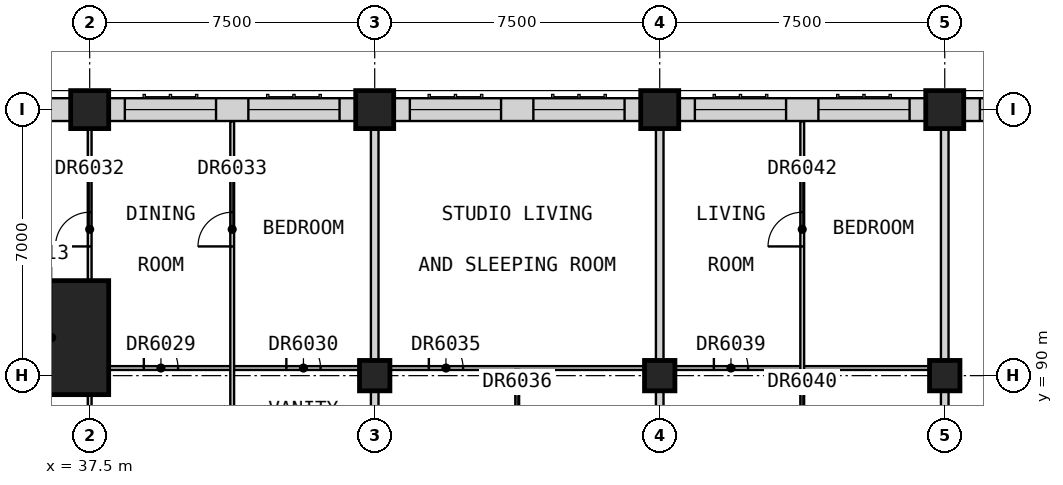
"""IFC4 building model, lengths in metres.
Left out: names, types, materials, properties, quantities, classifications, styles, units other than length and angle.
Written with IfcOpenShell. Run it as: python <this file> out.ifc"""

import sys

from ifc_helpers import new_model, si_unit, direction, frame, frame_2d, origin, origin_2d, place, context, subcontext, project, spatial, rectangle, extrude, element, fill, save


model = new_model("IFC4")
c1 = context("Model", 3, precision=1e-05, world=origin(), true_north=direction((0.0, 1.0)))
c2 = subcontext(c1, "Body", "Model", "MODEL_VIEW")
j1 = project(units=[si_unit("LENGTHUNIT", "METRE"), si_unit("PLANEANGLEUNIT", "RADIAN")], contexts=[c1])
p1 = place(None, origin())
s1 = spatial("IfcSite", under=j1, at=p1, CompositionType="ELEMENT")
p2 = place(p1, origin())
s2 = spatial("IfcBuilding", under=s1, at=p2, CompositionType="ELEMENT")
p3 = place(p2, frame((0.0, 0.0, 254.7)))
s3 = spatial("IfcBuildingStorey", under=s2, at=p3, CompositionType="ELEMENT", Elevation=254.7)
p4 = place(p3, frame((37.5, 97.0, 0.0), z_axis=(0.0, 0.0, 1.0), x_axis=(1.0, 0.0, 0.0)))
e1 = element("IfcColumn", 1, at=p4, inside=s3, PredefinedType="COLUMN", context=c2, shape_type="SweptSolid", body=[
    extrude(rectangle(XDim=1.0, YDim=1.0, at=origin_2d()), origin(), (0.0, 0.0, 1.0), 3.5),
])
p5 = place(p3, frame((45.0, 90.0, 0.0), z_axis=(0.0, 0.0, 1.0), x_axis=(1.0, 0.0, 0.0)))
e2 = element("IfcColumn", 2, at=p5, inside=s3, PredefinedType="COLUMN", context=c2, shape_type="SweptSolid", body=[
    extrude(rectangle(XDim=0.8, YDim=0.8, at=origin_2d()), origin(), (0.0, 0.0, 1.0), 3.5),
])
p6 = place(p3, frame((45.0, 97.0, 0.0), z_axis=(0.0, 0.0, 1.0), x_axis=(1.0, 0.0, 0.0)))
e3 = element("IfcColumn", 3, at=p6, inside=s3, PredefinedType="COLUMN", context=c2, shape_type="SweptSolid", body=[
    extrude(rectangle(XDim=1.0, YDim=1.0, at=origin_2d()), origin(), (0.0, 0.0, 1.0), 3.5),
])
p7 = place(p3, frame((52.5, 90.0, 0.0), z_axis=(0.0, 0.0, 1.0), x_axis=(1.0, 0.0, 0.0)))
e4 = element("IfcColumn", 4, at=p7, inside=s3, PredefinedType="COLUMN", context=c2, shape_type="SweptSolid", body=[
    extrude(rectangle(XDim=0.8, YDim=0.8, at=origin_2d()), origin(), (0.0, 0.0, 1.0), 3.5),
])
p8 = place(p3, frame((52.5, 97.0, 0.0), z_axis=(0.0, 0.0, 1.0), x_axis=(1.0, 0.0, 0.0)))
e5 = element("IfcColumn", 5, at=p8, inside=s3, PredefinedType="COLUMN", context=c2, shape_type="SweptSolid", body=[
    extrude(rectangle(XDim=1.0, YDim=1.0, at=origin_2d()), origin(), (0.0, 0.0, 1.0), 3.5),
])
p9 = place(p3, frame((60.0, 90.0, 0.0), z_axis=(0.0, 0.0, 1.0), x_axis=(1.0, 0.0, 0.0)))
e6 = element("IfcColumn", 6, at=p9, inside=s3, PredefinedType="COLUMN", context=c2, shape_type="SweptSolid", body=[
    extrude(rectangle(XDim=0.8, YDim=0.8, at=origin_2d()), origin(), (0.0, 0.0, 1.0), 3.5),
])
p10 = place(p3, frame((60.0, 97.0, 0.0), z_axis=(0.0, 0.0, 1.0), x_axis=(1.0, 0.0, 0.0)))
e7 = element("IfcColumn", 7, at=p10, inside=s3, PredefinedType="COLUMN", context=c2, shape_type="SweptSolid", body=[
    extrude(rectangle(XDim=1.0, YDim=1.0, at=origin_2d()), origin(), (0.0, 0.0, 1.0), 3.5),
])
p11 = place(p3, frame((36.5, 91.0, 0.0), z_axis=(0.0, 0.0, 1.0), x_axis=(1.0, 0.0, 0.0)))
e8 = element("IfcColumn", 8, at=p11, inside=s3, PredefinedType="COLUMN", context=c2, shape_type="SweptSolid", body=[
    extrude(rectangle(XDim=3.0, YDim=3.0, at=origin_2d()), origin(), (0.0, 0.0, 1.0), 3.5),
])
p12 = place(p3, frame((67.0, 97.0, 0.0), z_axis=(0.0, 0.0, 1.0), x_axis=(-1.0, 0.0, 0.0)))
e9 = element("IfcWall", 9, at=p12, inside=s3, PredefinedType="SOLIDWALL", context=c2, shape_type="SweptSolid", body=[
    extrude(rectangle(XDim=6.5, YDim=0.6, at=frame_2d((3.25, 0.0))), origin(), (0.0, 0.0, 1.0), 2.75),
])
p13 = place(p12, frame((3.675, 0.0, 0.8)))
e10 = element("IfcOpeningElement", 10, at=p13, cuts=e9, PredefinedType="OPENING", context=c2, shape_type="SweptSolid", body=[
    extrude(rectangle(XDim=2.4, YDim=1.8, at=frame_2d((1.2, 0.9))), frame((0.0, 0.31, 0.0), z_axis=(0.0, -1.0, 0.0), x_axis=(1.0, 0.0, 0.0)), (0.0, 0.0, 1.0), 0.62),
])
p14 = place(p12, frame((0.425, 0.0, 0.8)))
e11 = element("IfcOpeningElement", 11, at=p14, cuts=e9, PredefinedType="OPENING", context=c2, shape_type="SweptSolid", body=[
    extrude(rectangle(XDim=2.4, YDim=1.8, at=frame_2d((1.2, 0.9))), frame((0.0, 0.31, 0.0), z_axis=(0.0, -1.0, 0.0), x_axis=(1.0, 0.0, 0.0)), (0.0, 0.0, 1.0), 0.62),
])
p15 = place(p3, frame((59.5, 97.0, 0.0), z_axis=(0.0, 0.0, 1.0), x_axis=(-1.0, 0.0, 0.0)))
e12 = element("IfcWall", 12, at=p15, inside=s3, PredefinedType="SOLIDWALL", context=c2, shape_type="SweptSolid", body=[
    extrude(rectangle(XDim=6.5, YDim=0.6, at=frame_2d((3.25, 0.0))), origin(), (0.0, 0.0, 1.0), 2.75),
])
p16 = place(p15, frame((3.675, 0.0, 0.8)))
e13 = element("IfcOpeningElement", 13, at=p16, cuts=e12, PredefinedType="OPENING", context=c2, shape_type="SweptSolid", body=[
    extrude(rectangle(XDim=2.4, YDim=1.8, at=frame_2d((1.2, 0.9))), frame((0.0, 0.31, 0.0), z_axis=(0.0, -1.0, 0.0), x_axis=(1.0, 0.0, 0.0)), (0.0, 0.0, 1.0), 0.62),
])
p17 = place(p15, frame((0.425, 0.0, 0.8)))
e14 = element("IfcOpeningElement", 14, at=p17, cuts=e12, PredefinedType="OPENING", context=c2, shape_type="SweptSolid", body=[
    extrude(rectangle(XDim=2.4, YDim=1.8, at=frame_2d((1.2, 0.9))), frame((0.0, 0.31, 0.0), z_axis=(0.0, -1.0, 0.0), x_axis=(1.0, 0.0, 0.0)), (0.0, 0.0, 1.0), 0.62),
])
p18 = place(p3, frame((52.0, 97.0, 0.0), z_axis=(0.0, 0.0, 1.0), x_axis=(-1.0, 0.0, 0.0)))
e15 = element("IfcWall", 15, at=p18, inside=s3, PredefinedType="SOLIDWALL", context=c2, shape_type="SweptSolid", body=[
    extrude(rectangle(XDim=6.5, YDim=0.6, at=frame_2d((3.25, 0.0))), origin(), (0.0, 0.0, 1.0), 2.75),
])
p19 = place(p18, frame((3.675, 0.0, 0.8)))
e16 = element("IfcOpeningElement", 16, at=p19, cuts=e15, PredefinedType="OPENING", context=c2, shape_type="SweptSolid", body=[
    extrude(rectangle(XDim=2.4, YDim=1.8, at=frame_2d((1.2, 0.9))), frame((0.0, 0.31, 0.0), z_axis=(0.0, -1.0, 0.0), x_axis=(1.0, 0.0, 0.0)), (0.0, 0.0, 1.0), 0.62),
])
p20 = place(p18, frame((0.425, 0.0, 0.8)))
e17 = element("IfcOpeningElement", 17, at=p20, cuts=e15, PredefinedType="OPENING", context=c2, shape_type="SweptSolid", body=[
    extrude(rectangle(XDim=2.4, YDim=1.8, at=frame_2d((1.2, 0.9))), frame((0.0, 0.31, 0.0), z_axis=(0.0, -1.0, 0.0), x_axis=(1.0, 0.0, 0.0)), (0.0, 0.0, 1.0), 0.62),
])
p21 = place(p3, frame((44.5, 97.0, 0.0), z_axis=(0.0, 0.0, 1.0), x_axis=(-1.0, 0.0, 0.0)))
e18 = element("IfcWall", 18, at=p21, inside=s3, PredefinedType="SOLIDWALL", context=c2, shape_type="SweptSolid", body=[
    extrude(rectangle(XDim=6.5, YDim=0.6, at=frame_2d((3.25, 0.0))), origin(), (0.0, 0.0, 1.0), 2.75),
])
p22 = place(p21, frame((3.675, 0.0, 0.8)))
e19 = element("IfcOpeningElement", 19, at=p22, cuts=e18, PredefinedType="OPENING", context=c2, shape_type="SweptSolid", body=[
    extrude(rectangle(XDim=2.4, YDim=1.8, at=frame_2d((1.2, 0.9))), frame((0.0, 0.31, 0.0), z_axis=(0.0, -1.0, 0.0), x_axis=(1.0, 0.0, 0.0)), (0.0, 0.0, 1.0), 0.62),
])
p23 = place(p21, frame((0.425, 0.0, 0.8)))
e20 = element("IfcOpeningElement", 20, at=p23, cuts=e18, PredefinedType="OPENING", context=c2, shape_type="SweptSolid", body=[
    extrude(rectangle(XDim=2.4, YDim=1.8, at=frame_2d((1.2, 0.9))), frame((0.0, 0.31, 0.0), z_axis=(0.0, -1.0, 0.0), x_axis=(1.0, 0.0, 0.0)), (0.0, 0.0, 1.0), 0.62),
])
p24 = place(p3, frame((37.0, 97.0, 0.0), z_axis=(0.0, 0.0, 1.0), x_axis=(-1.0, 0.0, 0.0)))
e21 = element("IfcWall", 21, at=p24, inside=s3, PredefinedType="SOLIDWALL", context=c2, shape_type="SweptSolid", body=[
    extrude(rectangle(XDim=2.0, YDim=0.6, at=frame_2d((1.0, 0.0))), origin(), (0.0, 0.0, 1.0), 3.1),
])
for number, where, z_axis, x_axis in (
    (22, (45.0, 84.375, 0.0), (0.0, 0.0, 1.0), (0.0, 1.0, 0.0)),
    (23, (52.5, 84.375, 0.0), (0.0, 0.0, 1.0), (0.0, 1.0, 0.0)),
    (24, (60.0, 84.375, 0.0), (0.0, 0.0, 1.0), (0.0, 1.0, 0.0)),
):
    element("IfcWall", number, at=place(p3, frame(where, z_axis=z_axis, x_axis=x_axis)), inside=s3, PredefinedType="PARTITIONING", context=c2, shape_type="SweptSolid", body=[
        extrude(rectangle(XDim=13.125, YDim=0.2, at=frame_2d((6.562, 0.0))), origin(), (0.0, 0.0, 1.0), 3.1),
    ])
p25 = place(p3, frame((30.0, 90.2, 0.0), z_axis=(0.0, 0.0, 1.0), x_axis=(1.0, 0.0, 0.0)))
e25 = element("IfcWall", 25, at=p25, inside=s3, PredefinedType="PARTITIONING", context=c2, shape_type="SweptSolid", body=[
    extrude(rectangle(XDim=29.9, YDim=0.1, at=frame_2d((14.95, 0.0))), origin(), (0.0, 0.0, 1.0), 2.75),
])
p26 = place(p25, frame((1.425, 0.0, 0.0)))
e26 = element("IfcOpeningElement", 26, at=p26, cuts=e25, PredefinedType="OPENING", context=c2, shape_type="SweptSolid", body=[
    extrude(rectangle(XDim=0.9, YDim=2.1, at=frame_2d((0.45, 1.05))), frame((0.0, 0.06, 0.0), z_axis=(0.0, -1.0, 0.0), x_axis=(1.0, 0.0, 0.0)), (0.0, 0.0, 1.0), 0.12),
])
p27 = place(p25, frame((8.925, 0.0, 0.0)))
e27 = element("IfcOpeningElement", 27, at=p27, cuts=e25, PredefinedType="OPENING", context=c2, shape_type="SweptSolid", body=[
    extrude(rectangle(XDim=0.9, YDim=2.1, at=frame_2d((0.45, 1.05))), frame((0.0, 0.06, 0.0), z_axis=(0.0, -1.0, 0.0), x_axis=(1.0, 0.0, 0.0)), (0.0, 0.0, 1.0), 0.12),
])
p28 = place(p25, frame((12.675, 0.0, 0.0)))
e28 = element("IfcOpeningElement", 28, at=p28, cuts=e25, PredefinedType="OPENING", context=c2, shape_type="SweptSolid", body=[
    extrude(rectangle(XDim=0.9, YDim=2.1, at=frame_2d((0.45, 1.05))), frame((0.0, 0.06, 0.0), z_axis=(0.0, -1.0, 0.0), x_axis=(1.0, 0.0, 0.0)), (0.0, 0.0, 1.0), 0.12),
])
p29 = place(p25, frame((16.425, 0.0, 0.0)))
e29 = element("IfcOpeningElement", 29, at=p29, cuts=e25, PredefinedType="OPENING", context=c2, shape_type="SweptSolid", body=[
    extrude(rectangle(XDim=0.9, YDim=2.1, at=frame_2d((0.45, 1.05))), frame((0.0, 0.06, 0.0), z_axis=(0.0, -1.0, 0.0), x_axis=(1.0, 0.0, 0.0)), (0.0, 0.0, 1.0), 0.12),
])
p30 = place(p25, frame((23.925, 0.0, 0.0)))
e30 = element("IfcOpeningElement", 30, at=p30, cuts=e25, PredefinedType="OPENING", context=c2, shape_type="SweptSolid", body=[
    extrude(rectangle(XDim=0.9, YDim=2.1, at=frame_2d((0.45, 1.05))), frame((0.0, 0.06, 0.0), z_axis=(0.0, -1.0, 0.0), x_axis=(1.0, 0.0, 0.0)), (0.0, 0.0, 1.0), 0.12),
])
p31 = place(p3, frame((37.5, 87.312, 0.0), z_axis=(0.0, 0.0, 1.0), x_axis=(0.0, 1.0, 0.0)))
e31 = element("IfcWall", 31, at=p31, inside=s3, PredefinedType="PARTITIONING", context=c2, shape_type="SweptSolid", body=[
    extrude(rectangle(XDim=10.188, YDim=0.1, at=frame_2d((5.094, 0.0))), origin(), (0.0, 0.0, 1.0), 2.75),
])
p32 = place(p31, frame((6.087, 0.0, 0.0)))
e32 = element("IfcOpeningElement", 32, at=p32, cuts=e31, PredefinedType="OPENING", context=c2, shape_type="SweptSolid", body=[
    extrude(rectangle(XDim=0.9, YDim=2.1, at=frame_2d((0.45, 1.05))), frame((0.0, 0.06, 0.0), z_axis=(0.0, -1.0, 0.0), x_axis=(1.0, 0.0, 0.0)), (0.0, 0.0, 1.0), 0.12),
])
p33 = place(p3, frame((41.25, 87.312, 0.0), z_axis=(0.0, 0.0, 1.0), x_axis=(0.0, 1.0, 0.0)))
e33 = element("IfcWall", 33, at=p33, inside=s3, PredefinedType="PARTITIONING", context=c2, shape_type="SweptSolid", body=[
    extrude(rectangle(XDim=9.377, YDim=0.1, at=frame_2d((4.689, 0.0))), origin(), (0.0, 0.0, 1.0), 3.1),
])
p34 = place(p33, frame((6.087, 0.0, 0.0)))
e34 = element("IfcOpeningElement", 34, at=p34, cuts=e33, PredefinedType="OPENING", context=c2, shape_type="SweptSolid", body=[
    extrude(rectangle(XDim=0.9, YDim=2.1, at=frame_2d((0.45, 1.05))), frame((0.0, 0.06, 0.0), z_axis=(0.0, -1.0, 0.0), x_axis=(1.0, 0.0, 0.0)), (0.0, 0.0, 1.0), 0.12),
])
p35 = place(p3, frame((48.75, 87.312, 0.0), z_axis=(0.0, 0.0, 1.0), x_axis=(0.0, 1.0, 0.0)))
e35 = element("IfcWall", 35, at=p35, inside=s3, PredefinedType="PARTITIONING", context=c2, shape_type="SweptSolid", body=[
    extrude(rectangle(XDim=2.837, YDim=0.1, at=frame_2d((1.419, 0.0))), origin(), (0.0, 0.0, 1.0), 3.1),
])
p36 = place(p35, frame((0.962, 0.0, 0.0)))
e36 = element("IfcOpeningElement", 36, at=p36, cuts=e35, PredefinedType="OPENING", context=c2, shape_type="SweptSolid", body=[
    extrude(rectangle(XDim=0.9, YDim=2.1, at=frame_2d((0.45, 1.05))), frame((0.0, 0.06, 0.0), z_axis=(0.0, -1.0, 0.0), x_axis=(1.0, 0.0, 0.0)), (0.0, 0.0, 1.0), 0.12),
])
p37 = place(p3, frame((56.25, 87.312, 0.0), z_axis=(0.0, 0.0, 1.0), x_axis=(0.0, 1.0, 0.0)))
e37 = element("IfcWall", 37, at=p37, inside=s3, PredefinedType="PARTITIONING", context=c2, shape_type="SweptSolid", body=[
    extrude(rectangle(XDim=9.377, YDim=0.1, at=frame_2d((4.689, 0.0))), origin(), (0.0, 0.0, 1.0), 3.1),
])
p38 = place(p37, frame((0.962, 0.0, 0.0)))
e38 = element("IfcOpeningElement", 38, at=p38, cuts=e37, PredefinedType="OPENING", context=c2, shape_type="SweptSolid", body=[
    extrude(rectangle(XDim=0.9, YDim=2.1, at=frame_2d((0.45, 1.05))), frame((0.0, 0.06, 0.0), z_axis=(0.0, -1.0, 0.0), x_axis=(1.0, 0.0, 0.0)), (0.0, 0.0, 1.0), 0.12),
])
p39 = place(p37, frame((6.087, 0.0, 0.0)))
e39 = element("IfcOpeningElement", 39, at=p39, cuts=e37, PredefinedType="OPENING", context=c2, shape_type="SweptSolid", body=[
    extrude(rectangle(XDim=0.9, YDim=2.1, at=frame_2d((0.45, 1.05))), frame((0.0, 0.06, 0.0), z_axis=(0.0, -1.0, 0.0), x_axis=(1.0, 0.0, 0.0)), (0.0, 0.0, 1.0), 0.12),
])
p40 = place(p13, origin())
e40 = element("IfcWindow", 40, at=p40, inside=s3, PartitioningType="SINGLE_PANEL", PredefinedType="WINDOW", context=c2, shape_type="SweptSolid", body=[
    extrude(rectangle(XDim=2.4, YDim=1.8, at=frame_2d((1.2, 0.9))), frame((0.0, -0.07, 0.0), z_axis=(0.0, -1.0, 0.0), x_axis=(1.0, 0.0, 0.0)), (0.0, 0.0, 1.0), 0.06),
])
fill(e10, e40)
p41 = place(p16, origin())
e41 = element("IfcWindow", 41, at=p41, inside=s3, PartitioningType="SINGLE_PANEL", PredefinedType="WINDOW", context=c2, shape_type="SweptSolid", body=[
    extrude(rectangle(XDim=2.4, YDim=1.8, at=frame_2d((1.2, 0.9))), frame((0.0, -0.07, 0.0), z_axis=(0.0, -1.0, 0.0), x_axis=(1.0, 0.0, 0.0)), (0.0, 0.0, 1.0), 0.06),
])
fill(e13, e41)
p42 = place(p17, origin())
e42 = element("IfcWindow", 42, at=p42, inside=s3, PartitioningType="SINGLE_PANEL", PredefinedType="WINDOW", context=c2, shape_type="SweptSolid", body=[
    extrude(rectangle(XDim=2.4, YDim=1.8, at=frame_2d((1.2, 0.9))), frame((0.0, -0.07, 0.0), z_axis=(0.0, -1.0, 0.0), x_axis=(1.0, 0.0, 0.0)), (0.0, 0.0, 1.0), 0.06),
])
fill(e14, e42)
p43 = place(p19, origin())
e43 = element("IfcWindow", 43, at=p43, inside=s3, PartitioningType="SINGLE_PANEL", PredefinedType="WINDOW", context=c2, shape_type="SweptSolid", body=[
    extrude(rectangle(XDim=2.4, YDim=1.8, at=frame_2d((1.2, 0.9))), frame((0.0, -0.07, 0.0), z_axis=(0.0, -1.0, 0.0), x_axis=(1.0, 0.0, 0.0)), (0.0, 0.0, 1.0), 0.06),
])
fill(e16, e43)
p44 = place(p20, origin())
e44 = element("IfcWindow", 44, at=p44, inside=s3, PartitioningType="SINGLE_PANEL", PredefinedType="WINDOW", context=c2, shape_type="SweptSolid", body=[
    extrude(rectangle(XDim=2.4, YDim=1.8, at=frame_2d((1.2, 0.9))), frame((0.0, -0.07, 0.0), z_axis=(0.0, -1.0, 0.0), x_axis=(1.0, 0.0, 0.0)), (0.0, 0.0, 1.0), 0.06),
])
fill(e17, e44)
p45 = place(p22, origin())
e45 = element("IfcWindow", 45, at=p45, inside=s3, PartitioningType="SINGLE_PANEL", PredefinedType="WINDOW", context=c2, shape_type="SweptSolid", body=[
    extrude(rectangle(XDim=2.4, YDim=1.8, at=frame_2d((1.2, 0.9))), frame((0.0, -0.07, 0.0), z_axis=(0.0, -1.0, 0.0), x_axis=(1.0, 0.0, 0.0)), (0.0, 0.0, 1.0), 0.06),
])
fill(e19, e45)
p46 = place(p23, origin())
e46 = element("IfcWindow", 46, at=p46, inside=s3, PartitioningType="SINGLE_PANEL", PredefinedType="WINDOW", context=c2, shape_type="SweptSolid", body=[
    extrude(rectangle(XDim=2.4, YDim=1.8, at=frame_2d((1.2, 0.9))), frame((0.0, -0.07, 0.0), z_axis=(0.0, -1.0, 0.0), x_axis=(1.0, 0.0, 0.0)), (0.0, 0.0, 1.0), 0.06),
])
fill(e20, e46)
p47 = place(p27, origin())
e47 = element("IfcDoor", 47, at=p47, inside=s3, OperationType="SINGLE_SWING_RIGHT", PredefinedType="DOOR", context=c2, shape_type="SweptSolid", body=[
    extrude(rectangle(XDim=0.9, YDim=2.1, at=frame_2d((0.45, 1.05))), frame((0.0, 0.025, 0.0), z_axis=(0.0, -1.0, 0.0), x_axis=(1.0, 0.0, 0.0)), (0.0, 0.0, 1.0), 0.05),
])
fill(e27, e47)
p48 = place(p28, origin())
e48 = element("IfcDoor", 48, at=p48, inside=s3, OperationType="SINGLE_SWING_RIGHT", PredefinedType="DOOR", context=c2, shape_type="SweptSolid", body=[
    extrude(rectangle(XDim=0.9, YDim=2.1, at=frame_2d((0.45, 1.05))), frame((0.0, 0.025, 0.0), z_axis=(0.0, -1.0, 0.0), x_axis=(1.0, 0.0, 0.0)), (0.0, 0.0, 1.0), 0.05),
])
fill(e28, e48)
p49 = place(p32, origin())
e49 = element("IfcDoor", 49, at=p49, inside=s3, OperationType="SINGLE_SWING_LEFT", PredefinedType="DOOR", context=c2, shape_type="SweptSolid", body=[
    extrude(rectangle(XDim=0.9, YDim=2.1, at=frame_2d((0.45, 1.05))), frame((0.0, 0.025, 0.0), z_axis=(0.0, -1.0, 0.0), x_axis=(1.0, 0.0, 0.0)), (0.0, 0.0, 1.0), 0.05),
])
fill(e32, e49)
p50 = place(p34, origin())
e50 = element("IfcDoor", 50, at=p50, inside=s3, OperationType="SINGLE_SWING_LEFT", PredefinedType="DOOR", context=c2, shape_type="SweptSolid", body=[
    extrude(rectangle(XDim=0.9, YDim=2.1, at=frame_2d((0.45, 1.05))), frame((0.0, 0.025, 0.0), z_axis=(0.0, -1.0, 0.0), x_axis=(1.0, 0.0, 0.0)), (0.0, 0.0, 1.0), 0.05),
])
fill(e34, e50)
p51 = place(p29, origin())
e51 = element("IfcDoor", 51, at=p51, inside=s3, OperationType="SINGLE_SWING_RIGHT", PredefinedType="DOOR", context=c2, shape_type="SweptSolid", body=[
    extrude(rectangle(XDim=0.9, YDim=2.1, at=frame_2d((0.45, 1.05))), frame((0.0, 0.025, 0.0), z_axis=(0.0, -1.0, 0.0), x_axis=(1.0, 0.0, 0.0)), (0.0, 0.0, 1.0), 0.05),
])
fill(e29, e51)
p52 = place(p30, origin())
e52 = element("IfcDoor", 52, at=p52, inside=s3, OperationType="SINGLE_SWING_RIGHT", PredefinedType="DOOR", context=c2, shape_type="SweptSolid", body=[
    extrude(rectangle(XDim=0.9, YDim=2.1, at=frame_2d((0.45, 1.05))), frame((0.0, 0.025, 0.0), z_axis=(0.0, -1.0, 0.0), x_axis=(1.0, 0.0, 0.0)), (0.0, 0.0, 1.0), 0.05),
])
fill(e30, e52)
p53 = place(p39, origin())
e53 = element("IfcDoor", 53, at=p53, inside=s3, OperationType="SINGLE_SWING_LEFT", PredefinedType="DOOR", context=c2, shape_type="SweptSolid", body=[
    extrude(rectangle(XDim=0.9, YDim=2.1, at=frame_2d((0.45, 1.05))), frame((0.0, 0.025, 0.0), z_axis=(0.0, -1.0, 0.0), x_axis=(1.0, 0.0, 0.0)), (0.0, 0.0, 1.0), 0.05),
])
fill(e39, e53)
save(model, sys.argv[1])
